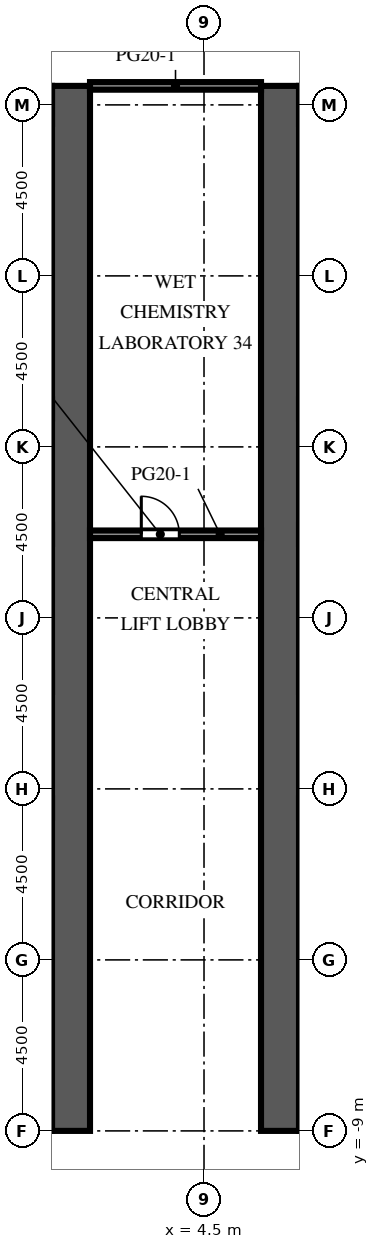
"""IFC4 building model, lengths in metres.
Left out: names, types, materials, properties, quantities, classifications, styles, units other than length and angle.
Written with IfcOpenShell. Run it as: python <this file> out.ifc"""

import sys

from ifc_helpers import new_model, si_unit, direction, frame, frame_2d, origin, place, context, subcontext, project, spatial, rectangle, extrude, element, fill, save


model = new_model("IFC4")
c1 = context("Model", 3, precision=1e-05, world=origin(), true_north=direction((0.0, 1.0)))
c2 = subcontext(c1, "Body", "Model", "MODEL_VIEW")
j1 = project(units=[si_unit("LENGTHUNIT", "METRE"), si_unit("PLANEANGLEUNIT", "RADIAN")], contexts=[c1])
p1 = place(None, origin())
s1 = spatial("IfcSite", under=j1, at=p1, CompositionType="ELEMENT")
p2 = place(p1, origin())
s2 = spatial("IfcBuilding", under=s1, at=p2, CompositionType="ELEMENT")
p3 = place(p2, frame((0.0, 0.0, 15.4)))
s3 = spatial("IfcBuildingStorey", under=s2, at=p3, CompositionType="ELEMENT", Elevation=15.4)
p4 = place(p3, frame((1.0, -9.0, 0.0), z_axis=(0.0, 0.0, 1.0), x_axis=(0.0, 1.0, 0.0)))
e1 = element("IfcWall", 1, at=p4, inside=s3, PredefinedType="SHEAR", context=c2, shape_type="SweptSolid", body=[
    extrude(rectangle(XDim=27.5, YDim=1.0, at=frame_2d((13.75, 0.0))), origin(), (0.0, 0.0, 1.0), 4.1),
])
p5 = place(p4, frame((12.55, 0.0, 0.0)))
e2 = element("IfcOpeningElement", 2, at=p5, cuts=e1, PredefinedType="OPENING", context=c2, shape_type="SweptSolid", body=[
    extrude(rectangle(XDim=2.4, YDim=2.4, at=frame_2d((1.2, 1.2))), frame((0.0, 0.51, 0.0), z_axis=(0.0, -1.0, 0.0), x_axis=(1.0, 0.0, 0.0)), (0.0, 0.0, 1.0), 1.02),
])
p6 = place(p4, frame((4.025, 0.0, 0.0)))
e3 = element("IfcOpeningElement", 3, at=p6, cuts=e1, PredefinedType="OPENING", context=c2, shape_type="SweptSolid", body=[
    extrude(rectangle(XDim=1.2, YDim=2.1, at=frame_2d((0.6, 1.05))), frame((0.0, 0.51, 0.0), z_axis=(0.0, -1.0, 0.0), x_axis=(1.0, 0.0, 0.0)), (0.0, 0.0, 1.0), 1.02),
])
p7 = place(p4, frame((22.275, 0.0, 0.0)))
e4 = element("IfcOpeningElement", 4, at=p7, cuts=e1, PredefinedType="OPENING", context=c2, shape_type="SweptSolid", body=[
    extrude(rectangle(XDim=1.2, YDim=2.1, at=frame_2d((0.6, 1.05))), frame((0.0, 0.51, 0.0), z_axis=(0.0, -1.0, 0.0), x_axis=(1.0, 0.0, 0.0)), (0.0, 0.0, 1.0), 1.02),
])
p8 = place(p3, frame((6.5, -9.0, 0.0), z_axis=(0.0, 0.0, 1.0), x_axis=(0.0, 1.0, 0.0)))
e5 = element("IfcWall", 5, at=p8, inside=s3, PredefinedType="SHEAR", context=c2, shape_type="SweptSolid", body=[
    extrude(rectangle(XDim=27.5, YDim=1.0, at=frame_2d((13.75, 0.0))), origin(), (0.0, 0.0, 1.0), 4.1),
])
p9 = place(p8, frame((12.55, 0.0, 0.0)))
e6 = element("IfcOpeningElement", 6, at=p9, cuts=e5, PredefinedType="OPENING", context=c2, shape_type="SweptSolid", body=[
    extrude(rectangle(XDim=2.4, YDim=2.4, at=frame_2d((1.2, 1.2))), frame((0.0, 0.51, 0.0), z_axis=(0.0, -1.0, 0.0), x_axis=(1.0, 0.0, 0.0)), (0.0, 0.0, 1.0), 1.02),
])
p10 = place(p8, frame((4.025, 0.0, 0.0)))
e7 = element("IfcOpeningElement", 7, at=p10, cuts=e5, PredefinedType="OPENING", context=c2, shape_type="SweptSolid", body=[
    extrude(rectangle(XDim=1.2, YDim=2.1, at=frame_2d((0.6, 1.05))), frame((0.0, 0.51, 0.0), z_axis=(0.0, -1.0, 0.0), x_axis=(1.0, 0.0, 0.0)), (0.0, 0.0, 1.0), 1.02),
])
p11 = place(p8, frame((22.275, 0.0, 0.0)))
e8 = element("IfcOpeningElement", 8, at=p11, cuts=e5, PredefinedType="OPENING", context=c2, shape_type="SweptSolid", body=[
    extrude(rectangle(XDim=1.2, YDim=2.1, at=frame_2d((0.6, 1.05))), frame((0.0, 0.51, 0.0), z_axis=(0.0, -1.0, 0.0), x_axis=(1.0, 0.0, 0.0)), (0.0, 0.0, 1.0), 1.02),
])
p12 = place(p3, frame((1.5, 6.7, 0.0), z_axis=(0.0, 0.0, 1.0), x_axis=(1.0, 0.0, 0.0)))
e9 = element("IfcWall", 9, at=p12, inside=s3, PredefinedType="PARTITIONING", context=c2, shape_type="SweptSolid", body=[
    extrude(rectangle(XDim=4.5, YDim=0.2, at=frame_2d((2.25, 0.0))), origin(), (0.0, 0.0, 1.0), 3.65),
])
p13 = place(p12, frame((1.35, 0.0, 0.0)))
e10 = element("IfcOpeningElement", 10, at=p13, cuts=e9, PredefinedType="OPENING", context=c2, shape_type="SweptSolid", body=[
    extrude(rectangle(XDim=1.0, YDim=2.1, at=frame_2d((0.5, 1.05))), frame((0.0, 0.11, 0.0), z_axis=(0.0, -1.0, 0.0), x_axis=(1.0, 0.0, 0.0)), (0.0, 0.0, 1.0), 0.22),
])
p14 = place(p3, frame((1.5, 18.5, 0.0), z_axis=(0.0, 0.0, 1.0), x_axis=(1.0, 0.0, 0.0)))
e11 = element("IfcWall", 11, at=p14, inside=s3, PredefinedType="PARTITIONING", context=c2, shape_type="SweptSolid", body=[
    extrude(rectangle(XDim=4.5, YDim=0.2, at=frame_2d((2.25, 0.0))), origin(), (0.0, 0.0, 1.0), 3.65),
])
p15 = place(p5, origin())
e12 = element("IfcDoor", 12, at=p15, inside=s3, OperationType="DOUBLE_DOOR_DOUBLE_SWING", PredefinedType="DOOR", context=c2, shape_type="SweptSolid", body=[
    extrude(rectangle(XDim=2.4, YDim=2.4, at=frame_2d((1.2, 1.2))), frame((0.0, 0.025, 0.0), z_axis=(0.0, -1.0, 0.0), x_axis=(1.0, 0.0, 0.0)), (0.0, 0.0, 1.0), 0.05),
])
fill(e2, e12)
p16 = place(p9, origin())
e13 = element("IfcDoor", 13, at=p16, inside=s3, OperationType="DOUBLE_DOOR_DOUBLE_SWING", PredefinedType="DOOR", context=c2, shape_type="SweptSolid", body=[
    extrude(rectangle(XDim=2.4, YDim=2.4, at=frame_2d((1.2, 1.2))), frame((0.0, 0.025, 0.0), z_axis=(0.0, -1.0, 0.0), x_axis=(1.0, 0.0, 0.0)), (0.0, 0.0, 1.0), 0.05),
])
fill(e6, e13)
p17 = place(p6, origin())
e14 = element("IfcDoor", 14, at=p17, inside=s3, OperationType="SINGLE_SWING_LEFT", PredefinedType="DOOR", context=c2, shape_type="SweptSolid", body=[
    extrude(rectangle(XDim=1.2, YDim=2.1, at=frame_2d((0.6, 1.05))), frame((0.0, 0.475, 0.0), z_axis=(0.0, -1.0, 0.0), x_axis=(1.0, 0.0, 0.0)), (0.0, 0.0, 1.0), 0.05),
])
fill(e3, e14)
p18 = place(p7, origin())
e15 = element("IfcDoor", 15, at=p18, inside=s3, OperationType="SINGLE_SWING_LEFT", PredefinedType="DOOR", context=c2, shape_type="SweptSolid", body=[
    extrude(rectangle(XDim=1.2, YDim=2.1, at=frame_2d((0.6, 1.05))), frame((0.0, 0.475, 0.0), z_axis=(0.0, -1.0, 0.0), x_axis=(1.0, 0.0, 0.0)), (0.0, 0.0, 1.0), 0.05),
])
fill(e4, e15)
p19 = place(p10, origin())
e16 = element("IfcDoor", 16, at=p19, inside=s3, OperationType="SINGLE_SWING_RIGHT", PredefinedType="DOOR", context=c2, shape_type="SweptSolid", body=[
    extrude(rectangle(XDim=1.2, YDim=2.1, at=frame_2d((0.6, 1.05))), frame((0.0, -0.425, 0.0), z_axis=(0.0, -1.0, 0.0), x_axis=(1.0, 0.0, 0.0)), (0.0, 0.0, 1.0), 0.05),
])
fill(e7, e16)
p20 = place(p11, origin())
e17 = element("IfcDoor", 17, at=p20, inside=s3, OperationType="SINGLE_SWING_RIGHT", PredefinedType="DOOR", context=c2, shape_type="SweptSolid", body=[
    extrude(rectangle(XDim=1.2, YDim=2.1, at=frame_2d((0.6, 1.05))), frame((0.0, -0.425, 0.0), z_axis=(0.0, -1.0, 0.0), x_axis=(1.0, 0.0, 0.0)), (0.0, 0.0, 1.0), 0.05),
])
fill(e8, e17)
p21 = place(p13, origin())
e18 = element("IfcDoor", 18, at=p21, inside=s3, OperationType="SINGLE_SWING_LEFT", PredefinedType="DOOR", context=c2, shape_type="SweptSolid", body=[
    extrude(rectangle(XDim=1.0, YDim=2.1, at=frame_2d((0.5, 1.05))), frame((0.0, 0.025, 0.0), z_axis=(0.0, -1.0, 0.0), x_axis=(1.0, 0.0, 0.0)), (0.0, 0.0, 1.0), 0.05),
])
fill(e10, e18)
save(model, sys.argv[1])
